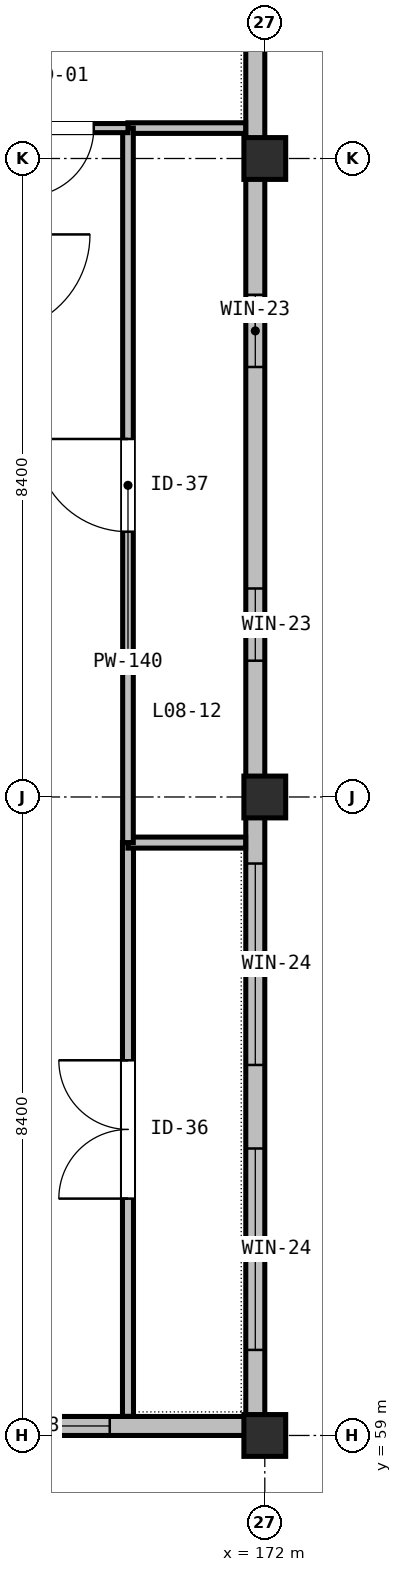
"""IFC4 building model, lengths in metres.
Left out: names, types, materials, properties, quantities, classifications, styles, units other than length and angle.
Written with IfcOpenShell. Run it as: python <this file> out.ifc"""

import sys

from ifc_helpers import new_model, si_unit, direction, frame, frame_2d, origin, origin_2d, place, context, subcontext, project, spatial, rectangle, extrude, element, fill, save


model = new_model("IFC4")
c1 = context("Model", 3, precision=1e-05, world=origin(), true_north=direction((0.0, 1.0)))
c2 = subcontext(c1, "Body", "Model", "MODEL_VIEW")
j1 = project(units=[si_unit("LENGTHUNIT", "METRE"), si_unit("PLANEANGLEUNIT", "RADIAN")], contexts=[c1])
p1 = place(None, origin())
s1 = spatial("IfcSite", under=j1, at=p1, CompositionType="ELEMENT")
p2 = place(p1, origin())
s2 = spatial("IfcBuilding", under=s1, at=p2, CompositionType="ELEMENT")
p3 = place(p2, frame((0.0, 0.0, 36.6)))
s3 = spatial("IfcBuildingStorey", under=s2, at=p3, CompositionType="ELEMENT", Elevation=36.6)
for number, where, z_axis, x_axis in (
    (1, (172.0, 59.0, 0.0), (0.0, 0.0, 1.0), (1.0, 0.0, 0.0)),
    (2, (172.0, 67.4, 0.0), (0.0, 0.0, 1.0), (1.0, 0.0, 0.0)),
    (3, (172.0, 75.8, 0.0), (0.0, 0.0, 1.0), (1.0, 0.0, 0.0)),
):
    element("IfcColumn", number, at=place(p3, frame(where, z_axis=z_axis, x_axis=x_axis)), inside=s3, PredefinedType="COLUMN", context=c2, shape_type="SweptSolid", body=[
        extrude(rectangle(XDim=0.55, YDim=0.55, at=origin_2d()), origin(), (0.0, 0.0, 1.0), 3.9),
    ])
p4 = place(p3, frame((171.875, 83.95, 0.0), z_axis=(0.0, 0.0, 1.0), x_axis=(0.0, -1.0, 0.0)))
e4 = element("IfcWall", 4, at=p4, inside=s3, PredefinedType="STANDARD", context=c2, shape_type="SweptSolid", body=[
    extrude(rectangle(XDim=8.15, YDim=0.25, at=frame_2d((4.075, 0.0))), origin(), (0.0, 0.0, 1.0), 3.285),
])
p5 = place(p4, frame((1.601, 0.0, 0.95)))
e5 = element("IfcOpeningElement", 5, at=p5, cuts=e4, PredefinedType="OPENING", context=c2, shape_type="SweptSolid", body=[
    extrude(rectangle(XDim=1.2, YDim=1.5, at=frame_2d((0.6, 0.75))), frame((0.0, 0.135, 0.0), z_axis=(0.0, -1.0, 0.0), x_axis=(1.0, 0.0, 0.0)), (0.0, 0.0, 1.0), 0.27),
])
p6 = place(p4, frame((5.35, 0.0, 0.95)))
e6 = element("IfcOpeningElement", 6, at=p6, cuts=e4, PredefinedType="OPENING", context=c2, shape_type="SweptSolid", body=[
    extrude(rectangle(XDim=1.2, YDim=1.5, at=frame_2d((0.6, 0.75))), frame((0.0, 0.135, 0.0), z_axis=(0.0, -1.0, 0.0), x_axis=(1.0, 0.0, 0.0)), (0.0, 0.0, 1.0), 0.27),
])
p7 = place(p3, frame((171.875, 75.8, 0.0), z_axis=(0.0, 0.0, 1.0), x_axis=(0.0, -1.0, 0.0)))
e7 = element("IfcWall", 7, at=p7, inside=s3, PredefinedType="STANDARD", context=c2, shape_type="SweptSolid", body=[
    extrude(rectangle(XDim=8.4, YDim=0.25, at=frame_2d((4.2, 0.0))), origin(), (0.0, 0.0, 1.0), 3.285),
])
p8 = place(p7, frame((1.793, 0.0, 0.9)))
e8 = element("IfcOpeningElement", 8, at=p8, cuts=e7, PredefinedType="OPENING", context=c2, shape_type="SweptSolid", body=[
    extrude(rectangle(XDim=0.95, YDim=1.8, at=frame_2d((0.475, 0.9))), frame((0.0, 0.135, 0.0), z_axis=(0.0, -1.0, 0.0), x_axis=(1.0, 0.0, 0.0)), (0.0, 0.0, 1.0), 0.27),
])
p9 = place(p7, frame((5.657, 0.0, 0.9)))
e9 = element("IfcOpeningElement", 9, at=p9, cuts=e7, PredefinedType="OPENING", context=c2, shape_type="SweptSolid", body=[
    extrude(rectangle(XDim=0.95, YDim=1.8, at=frame_2d((0.475, 0.9))), frame((0.0, 0.135, 0.0), z_axis=(0.0, -1.0, 0.0), x_axis=(1.0, 0.0, 0.0)), (0.0, 0.0, 1.0), 0.27),
])
p10 = place(p3, frame((171.875, 67.4, 0.0), z_axis=(0.0, 0.0, 1.0), x_axis=(0.0, -1.0, 0.0)))
e10 = element("IfcWall", 10, at=p10, inside=s3, PredefinedType="STANDARD", context=c2, shape_type="SweptSolid", body=[
    extrude(rectangle(XDim=8.15, YDim=0.25, at=frame_2d((4.075, 0.0))), origin(), (0.0, 0.0, 1.0), 3.285),
])
p11 = place(p10, frame((0.875, 0.0, 0.9)))
e11 = element("IfcOpeningElement", 11, at=p11, cuts=e10, PredefinedType="OPENING", context=c2, shape_type="SweptSolid", body=[
    extrude(rectangle(XDim=2.65, YDim=1.85, at=frame_2d((1.325, 0.925))), frame((0.0, 0.135, 0.0), z_axis=(0.0, -1.0, 0.0), x_axis=(1.0, 0.0, 0.0)), (0.0, 0.0, 1.0), 0.27),
])
p12 = place(p10, frame((4.625, 0.0, 0.9)))
e12 = element("IfcOpeningElement", 12, at=p12, cuts=e10, PredefinedType="OPENING", context=c2, shape_type="SweptSolid", body=[
    extrude(rectangle(XDim=2.65, YDim=1.85, at=frame_2d((1.325, 0.925))), frame((0.0, 0.135, 0.0), z_axis=(0.0, -1.0, 0.0), x_axis=(1.0, 0.0, 0.0)), (0.0, 0.0, 1.0), 0.27),
])
p13 = place(p3, frame((172.0, 59.125, 0.0), z_axis=(0.0, 0.0, 1.0), x_axis=(-1.0, 0.0, 0.0)))
e13 = element("IfcWall", 13, at=p13, inside=s3, PredefinedType="STANDARD", context=c2, shape_type="SweptSolid", body=[
    extrude(rectangle(XDim=6.8, YDim=0.25, at=frame_2d((3.4, 0.0))), origin(), (0.0, 0.0, 1.0), 3.185),
])
p14 = place(p13, frame((2.04, 0.0, 0.9)))
e14 = element("IfcOpeningElement", 14, at=p14, cuts=e13, PredefinedType="OPENING", context=c2, shape_type="SweptSolid", body=[
    extrude(rectangle(XDim=2.25, YDim=2.1, at=frame_2d((1.125, 1.05))), frame((0.0, 0.135, 0.0), z_axis=(0.0, -1.0, 0.0), x_axis=(1.0, 0.0, 0.0)), (0.0, 0.0, 1.0), 0.27),
])
p15 = place(p3, frame((170.2, 59.252, 0.0), z_axis=(0.0, 0.0, 1.0), x_axis=(0.0, 1.0, 0.0)))
e15 = element("IfcWall", 15, at=p15, inside=s3, PredefinedType="PARTITIONING", context=c2, shape_type="SweptSolid", body=[
    extrude(rectangle(XDim=7.548, YDim=0.145, at=frame_2d((3.774, 0.0))), origin(), (0.0, 0.0, 1.0), 3.335),
])
p16 = place(p15, frame((2.864, 0.0, 0.0)))
e16 = element("IfcOpeningElement", 16, at=p16, cuts=e15, PredefinedType="OPENING", context=c2, shape_type="SweptSolid", body=[
    extrude(rectangle(XDim=1.82, YDim=2.2, at=frame_2d((0.91, 1.1))), frame((0.0, 0.083, 0.0), z_axis=(0.0, -1.0, 0.0), x_axis=(1.0, 0.0, 0.0)), (0.0, 0.0, 1.0), 0.165),
])
p17 = place(p3, frame((170.2, 66.8, 0.0), z_axis=(0.0, 0.0, 1.0), x_axis=(1.0, 0.0, 0.0)))
e17 = element("IfcWall", 17, at=p17, inside=s3, PredefinedType="PARTITIONING", context=c2, shape_type="SweptSolid", body=[
    extrude(rectangle(XDim=1.548, YDim=0.145, at=frame_2d((0.774, 0.0))), origin(), (0.0, 0.0, 1.0), 3.335),
])
p18 = place(p3, frame((170.2, 76.2, 0.0), z_axis=(0.0, 0.0, 1.0), x_axis=(1.0, 0.0, 0.0)))
e18 = element("IfcWall", 18, at=p18, inside=s3, PredefinedType="PARTITIONING", context=c2, shape_type="SweptSolid", body=[
    extrude(rectangle(XDim=1.548, YDim=0.14, at=frame_2d((0.774, 0.0))), origin(), (0.0, 0.0, 1.0), 3.335),
])
p19 = place(p3, frame((170.2, 66.8, 0.0), z_axis=(0.0, 0.0, 1.0), x_axis=(0.0, 1.0, 0.0)))
e19 = element("IfcWall", 19, at=p19, inside=s3, PredefinedType="PARTITIONING", context=c2, shape_type="SweptSolid", body=[
    extrude(rectangle(XDim=9.4, YDim=0.14, at=frame_2d((4.7, 0.0))), origin(), (0.0, 0.0, 1.0), 3.285),
])
p20 = place(p19, frame((4.09, 0.0, 0.0)))
e20 = element("IfcOpeningElement", 20, at=p20, cuts=e19, PredefinedType="OPENING", context=c2, shape_type="SweptSolid", body=[
    extrude(rectangle(XDim=1.22, YDim=2.18, at=frame_2d((0.61, 1.09))), frame((0.0, 0.08, 0.0), z_axis=(0.0, -1.0, 0.0), x_axis=(1.0, 0.0, 0.0)), (0.0, 0.0, 1.0), 0.16),
])
p21 = place(p3, frame((170.2, 76.2, 0.0), z_axis=(0.0, 0.0, 1.0), x_axis=(-1.0, 0.0, 0.0)))
e21 = element("IfcWall", 21, at=p21, inside=s3, PredefinedType="PARTITIONING", context=c2, shape_type="SweptSolid", body=[
    extrude(rectangle(XDim=1.8, YDim=0.12, at=frame_2d((0.9, 0.0))), origin(), (0.0, 0.0, 1.0), 3.435),
])
p22 = place(p21, frame((0.45, 0.0, 0.0)))
e22 = element("IfcOpeningElement", 22, at=p22, cuts=e21, PredefinedType="OPENING", context=c2, shape_type="SweptSolid", body=[
    extrude(rectangle(XDim=0.9, YDim=2.02, at=frame_2d((0.45, 1.01))), frame((0.0, 0.07, 0.0), z_axis=(0.0, -1.0, 0.0), x_axis=(1.0, 0.0, 0.0)), (0.0, 0.0, 1.0), 0.14),
])
p23 = place(p8, origin())
e23 = element("IfcWindow", 23, at=p23, inside=s3, PartitioningType="SINGLE_PANEL", PredefinedType="WINDOW", context=c2, shape_type="SweptSolid", body=[
    extrude(rectangle(XDim=0.95, YDim=1.8, at=frame_2d((0.475, 0.9))), frame((0.0, 0.03, 0.0), z_axis=(0.0, -1.0, 0.0), x_axis=(1.0, 0.0, 0.0)), (0.0, 0.0, 1.0), 0.06),
])
fill(e8, e23)
p24 = place(p9, origin())
e24 = element("IfcWindow", 24, at=p24, inside=s3, PartitioningType="SINGLE_PANEL", PredefinedType="WINDOW", context=c2, shape_type="SweptSolid", body=[
    extrude(rectangle(XDim=0.95, YDim=1.8, at=frame_2d((0.475, 0.9))), frame((0.0, 0.03, 0.0), z_axis=(0.0, -1.0, 0.0), x_axis=(1.0, 0.0, 0.0)), (0.0, 0.0, 1.0), 0.06),
])
fill(e9, e24)
p25 = place(p11, origin())
e25 = element("IfcWindow", 25, at=p25, inside=s3, PartitioningType="SINGLE_PANEL", PredefinedType="WINDOW", context=c2, shape_type="SweptSolid", body=[
    extrude(rectangle(XDim=2.65, YDim=1.85, at=frame_2d((1.325, 0.925))), frame((0.0, 0.03, 0.0), z_axis=(0.0, -1.0, 0.0), x_axis=(1.0, 0.0, 0.0)), (0.0, 0.0, 1.0), 0.06),
])
fill(e11, e25)
p26 = place(p12, origin())
e26 = element("IfcWindow", 26, at=p26, inside=s3, PartitioningType="SINGLE_PANEL", PredefinedType="WINDOW", context=c2, shape_type="SweptSolid", body=[
    extrude(rectangle(XDim=2.65, YDim=1.85, at=frame_2d((1.325, 0.925))), frame((0.0, 0.03, 0.0), z_axis=(0.0, -1.0, 0.0), x_axis=(1.0, 0.0, 0.0)), (0.0, 0.0, 1.0), 0.06),
])
fill(e12, e26)
p27 = place(p14, origin())
e27 = element("IfcWindow", 27, at=p27, inside=s3, PartitioningType="SINGLE_PANEL", PredefinedType="WINDOW", context=c2, shape_type="SweptSolid", body=[
    extrude(rectangle(XDim=2.25, YDim=2.1, at=frame_2d((1.125, 1.05))), frame((0.0, 0.03, 0.0), z_axis=(0.0, -1.0, 0.0), x_axis=(1.0, 0.0, 0.0)), (0.0, 0.0, 1.0), 0.06),
])
fill(e14, e27)
p28 = place(p16, origin())
e28 = element("IfcDoor", 28, at=p28, inside=s3, OperationType="DOUBLE_DOOR_SINGLE_SWING", PredefinedType="DOOR", context=c2, shape_type="SweptSolid", body=[
    extrude(rectangle(XDim=1.82, YDim=2.2, at=frame_2d((0.91, 1.1))), frame((0.0, 0.025, 0.0), z_axis=(0.0, -1.0, 0.0), x_axis=(1.0, 0.0, 0.0)), (0.0, 0.0, 1.0), 0.05),
])
fill(e16, e28)
p29 = place(p20, origin())
e29 = element("IfcDoor", 29, at=p29, inside=s3, OperationType="SINGLE_SWING_RIGHT", PredefinedType="DOOR", context=c2, shape_type="SweptSolid", body=[
    extrude(rectangle(XDim=1.22, YDim=2.18, at=frame_2d((0.61, 1.09))), frame((0.0, 0.025, 0.0), z_axis=(0.0, -1.0, 0.0), x_axis=(1.0, 0.0, 0.0)), (0.0, 0.0, 1.0), 0.05),
])
fill(e20, e29)
p30 = place(p22, origin())
e30 = element("IfcDoor", 30, at=p30, inside=s3, OperationType="SINGLE_SWING_RIGHT", PredefinedType="DOOR", context=c2, shape_type="SweptSolid", body=[
    extrude(rectangle(XDim=0.9, YDim=2.02, at=frame_2d((0.45, 1.01))), frame((0.0, 0.025, 0.0), z_axis=(0.0, -1.0, 0.0), x_axis=(1.0, 0.0, 0.0)), (0.0, 0.0, 1.0), 0.05),
])
fill(e22, e30)
save(model, sys.argv[1])
